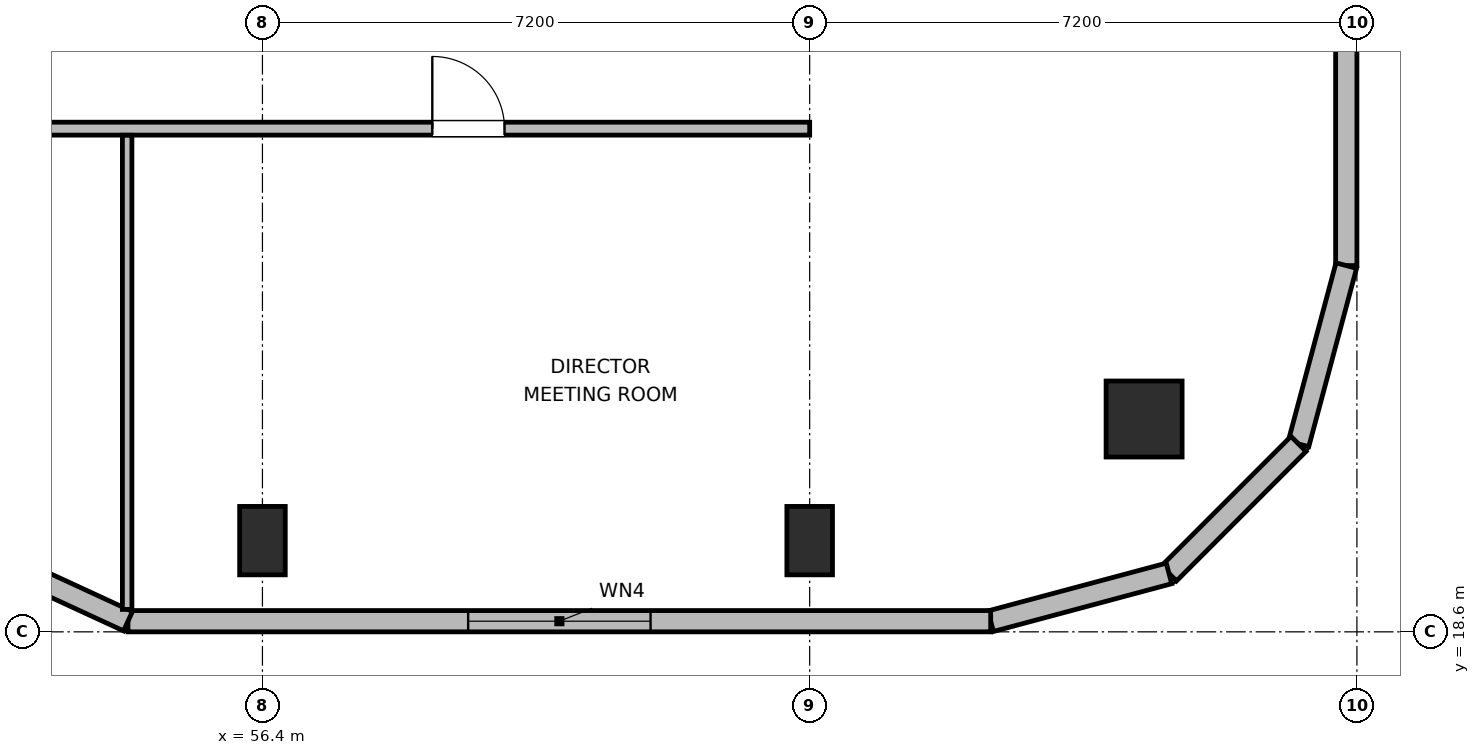
"""IFC4 building model, lengths in metres.
Left out: names, types, materials, properties, quantities, classifications, styles, units other than length and angle.
Written with IfcOpenShell. Run it as: python <this file> out.ifc"""

import sys

from ifc_helpers import new_model, si_unit, direction, frame, frame_2d, origin, origin_2d, place, context, subcontext, project, spatial, rectangle, circle, extrude, element, fill, save


model = new_model("IFC4")
c1 = context("Model", 3, precision=1e-05, world=origin(), true_north=direction((0.0, 1.0)))
c2 = subcontext(c1, "Body", "Model", "MODEL_VIEW")
j1 = project(units=[si_unit("LENGTHUNIT", "METRE"), si_unit("PLANEANGLEUNIT", "RADIAN")], contexts=[c1])
p1 = place(None, origin())
s1 = spatial("IfcSite", under=j1, at=p1, CompositionType="ELEMENT")
p2 = place(p1, origin())
s2 = spatial("IfcBuilding", under=s1, at=p2, CompositionType="ELEMENT")
p3 = place(p2, frame((0.0, 0.0, 337.5)))
s3 = spatial("IfcBuildingStorey", under=s2, at=p3, CompositionType="ELEMENT", Elevation=337.5)
p4 = place(p3, frame((68.0, 21.4, 0.0), z_axis=(0.0, 0.0, 1.0), x_axis=(1.0, 0.0, 0.0)))
e1 = element("IfcColumn", 1, at=p4, inside=s3, PredefinedType="COLUMN", context=c2, shape_type="SweptSolid", body=[
    extrude(circle(Radius=0.5, at=origin_2d()), origin(), (0.0, 0.0, 1.0), 4.5),
])
for number, where, z_axis, x_axis in (
    (2, (56.4, 19.8, 0.0), (0.0, 0.0, 1.0), (1.0, 0.0, 0.0)),
    (3, (63.6, 19.8, 0.0), (0.0, 0.0, 1.0), (1.0, 0.0, 0.0)),
):
    element("IfcColumn", number, at=place(p3, frame(where, z_axis=z_axis, x_axis=x_axis)), inside=s3, PredefinedType="COLUMN", context=c2, shape_type="SweptSolid", body=[
        extrude(rectangle(XDim=0.6, YDim=0.9, at=origin_2d()), origin(), (0.0, 0.0, 1.0), 4.5),
    ])
p5 = place(p3, frame((70.66, 37.66, 0.0), z_axis=(0.0, 0.0, 1.0), x_axis=(0.0, -1.0, 0.0)))
e4 = element("IfcWall", 4, at=p5, inside=s3, PredefinedType="SOLIDWALL", context=c2, shape_type="SweptSolid", body=[
    extrude(rectangle(XDim=14.241, YDim=0.28, at=frame_2d((7.121, 0.0))), origin(), (0.0, 0.0, 1.0), 4.28),
])
p6 = place(p5, frame((6.321, 0.0, 0.85)))
e5 = element("IfcOpeningElement", 5, at=p6, cuts=e4, PredefinedType="OPENING", context=c2, shape_type="SweptSolid", body=[
    extrude(rectangle(XDim=1.6, YDim=1.0, at=frame_2d((0.8, 0.5))), frame((0.0, 0.15, 0.0), z_axis=(0.0, -1.0, 0.0), x_axis=(1.0, 0.0, 0.0)), (0.0, 0.0, 1.0), 0.3),
])
p7 = place(p3, frame((70.66, 23.418, 0.0), z_axis=(0.0, 0.0, 1.0), x_axis=(-0.258751159445, -0.965944013639, 0.0)))
e6 = element("IfcWall", 6, at=p7, inside=s3, PredefinedType="SOLIDWALL", context=c2, shape_type="SweptSolid", body=[
    extrude(rectangle(XDim=2.429, YDim=0.28, at=frame_2d((1.214, 0.0))), origin(), (0.0, 0.0, 1.0), 4.28),
])
p8 = place(p3, frame((70.031, 21.073, 0.0), z_axis=(0.0, 0.0, 1.0), x_axis=(-0.707106781187, -0.707106781187, 0.0)))
e7 = element("IfcWall", 7, at=p8, inside=s3, PredefinedType="SOLIDWALL", context=c2, shape_type="SweptSolid", body=[
    extrude(rectangle(XDim=2.41, YDim=0.28, at=frame_2d((1.205, 0.0))), origin(), (0.0, 0.0, 1.0), 4.28),
])
p9 = place(p3, frame((68.327, 19.368, 0.0), z_axis=(0.0, 0.0, 1.0), x_axis=(-0.965937282298, -0.25877628691, 0.0)))
e8 = element("IfcWall", 8, at=p9, inside=s3, PredefinedType="SOLIDWALL", context=c2, shape_type="SweptSolid", body=[
    extrude(rectangle(XDim=2.428, YDim=0.28, at=frame_2d((1.214, 0.0))), origin(), (0.0, 0.0, 1.0), 4.28),
])
p10 = place(p3, frame((65.982, 18.74, 0.0), z_axis=(0.0, 0.0, 1.0), x_axis=(-1.0, 0.0, 0.0)))
e9 = element("IfcWall", 9, at=p10, inside=s3, PredefinedType="SOLIDWALL", context=c2, shape_type="SweptSolid", body=[
    extrude(rectangle(XDim=11.351, YDim=0.28, at=frame_2d((5.676, 0.0))), origin(), (0.0, 0.0, 1.0), 4.28),
])
p11 = place(p10, frame((4.475, 0.0, 0.85)))
e10 = element("IfcOpeningElement", 10, at=p11, cuts=e9, PredefinedType="OPENING", context=c2, shape_type="SweptSolid", body=[
    extrude(rectangle(XDim=2.4, YDim=1.15, at=frame_2d((1.2, 0.575))), frame((0.0, 0.15, 0.0), z_axis=(0.0, -1.0, 0.0), x_axis=(1.0, 0.0, 0.0)), (0.0, 0.0, 1.0), 0.3),
])
p12 = place(p3, frame((54.631, 18.74, 0.0), z_axis=(0.0, 0.0, 1.0), x_axis=(-0.907956889006, 0.419063584324, 0.0)))
e11 = element("IfcWall", 11, at=p12, inside=s3, PredefinedType="SOLIDWALL", context=c2, shape_type="SweptSolid", body=[
    extrude(rectangle(XDim=2.864, YDim=0.28, at=frame_2d((1.432, 0.0))), origin(), (0.0, 0.0, 1.0), 2.865),
])
p13 = place(p3, frame((30.075, 25.22, 0.0), z_axis=(0.0, 0.0, 1.0), x_axis=(1.0, 0.0, 0.0)))
e12 = element("IfcWall", 12, at=p13, inside=s3, PredefinedType="PARTITIONING", context=c2, shape_type="SweptSolid", body=[
    extrude(rectangle(XDim=33.525, YDim=0.17, at=frame_2d((16.763, 0.0))), origin(), (0.0, 0.0, 1.0), 4.28),
])
p14 = place(p13, frame((4.018, 0.0, 0.0)))
e13 = element("IfcOpeningElement", 13, at=p14, cuts=e12, PredefinedType="OPENING", context=c2, shape_type="SweptSolid", body=[
    extrude(rectangle(XDim=0.95, YDim=2.04, at=frame_2d((0.475, 1.02))), frame((0.0, 0.095, 0.0), z_axis=(0.0, -1.0, 0.0), x_axis=(1.0, 0.0, 0.0)), (0.0, 0.0, 1.0), 0.19),
])
p15 = place(p13, frame((12.4, 0.0, 0.0)))
e14 = element("IfcOpeningElement", 14, at=p15, cuts=e12, PredefinedType="OPENING", context=c2, shape_type="SweptSolid", body=[
    extrude(rectangle(XDim=0.95, YDim=2.04, at=frame_2d((0.475, 1.02))), frame((0.0, 0.095, 0.0), z_axis=(0.0, -1.0, 0.0), x_axis=(1.0, 0.0, 0.0)), (0.0, 0.0, 1.0), 0.19),
])
p16 = place(p13, frame((20.18, 0.0, 0.0)))
e15 = element("IfcOpeningElement", 15, at=p16, cuts=e12, PredefinedType="OPENING", context=c2, shape_type="SweptSolid", body=[
    extrude(rectangle(XDim=0.95, YDim=2.04, at=frame_2d((0.475, 1.02))), frame((0.0, 0.095, 0.0), z_axis=(0.0, -1.0, 0.0), x_axis=(1.0, 0.0, 0.0)), (0.0, 0.0, 1.0), 0.19),
])
p17 = place(p13, frame((28.56, 0.0, 0.0)))
e16 = element("IfcOpeningElement", 16, at=p17, cuts=e12, PredefinedType="OPENING", context=c2, shape_type="SweptSolid", body=[
    extrude(rectangle(XDim=0.95, YDim=2.04, at=frame_2d((0.475, 1.02))), frame((0.0, 0.095, 0.0), z_axis=(0.0, -1.0, 0.0), x_axis=(1.0, 0.0, 0.0)), (0.0, 0.0, 1.0), 0.19),
])
p18 = place(p3, frame((54.62, 18.895, 0.0), z_axis=(0.0, 0.0, 1.0), x_axis=(0.0, 1.0, 0.0)))
e17 = element("IfcWall", 17, at=p18, inside=s3, PredefinedType="PARTITIONING", context=c2, shape_type="SweptSolid", body=[
    extrude(rectangle(XDim=6.238, YDim=0.125, at=frame_2d((3.119, 0.0))), origin(), (0.0, 0.0, 1.0), 3.643),
])
p19 = place(p11, origin())
e18 = element("IfcWindow", 18, at=p19, inside=s3, PartitioningType="SINGLE_PANEL", PredefinedType="WINDOW", context=c2, shape_type="SweptSolid", body=[
    extrude(rectangle(XDim=2.4, YDim=1.15, at=frame_2d((1.2, 0.575))), frame((0.0, 0.03, 0.0), z_axis=(0.0, -1.0, 0.0), x_axis=(1.0, 0.0, 0.0)), (0.0, 0.0, 1.0), 0.06),
])
fill(e10, e18)
p20 = place(p17, origin())
e19 = element("IfcDoor", 19, at=p20, inside=s3, OperationType="SINGLE_SWING_LEFT", PredefinedType="DOOR", context=c2, shape_type="SweptSolid", body=[
    extrude(rectangle(XDim=0.95, YDim=2.04, at=frame_2d((0.475, 1.02))), frame((0.0, 0.025, 0.0), z_axis=(0.0, -1.0, 0.0), x_axis=(1.0, 0.0, 0.0)), (0.0, 0.0, 1.0), 0.05),
])
fill(e16, e19)
save(model, sys.argv[1])
